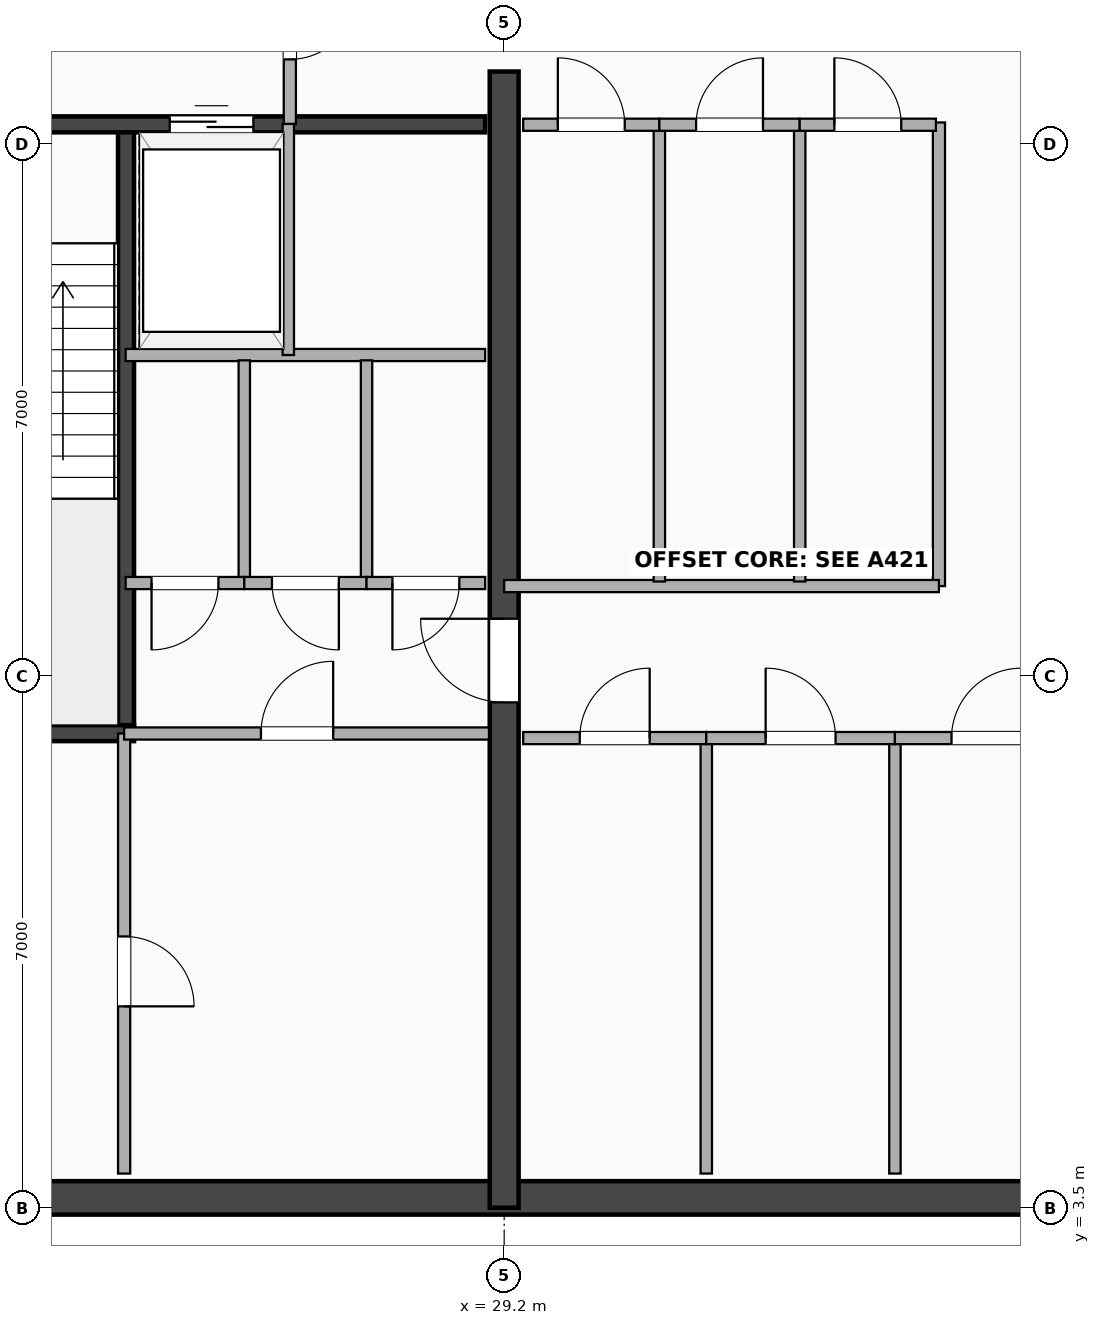
"""IFC4 building model, lengths in metres.
Left out: names, types, materials, properties, quantities, classifications, styles, units other than length and angle.
Written with IfcOpenShell. Run it as: python <this file> out.ifc"""

import sys

from ifc_helpers import new_model, si_unit, direction, frame, frame_2d, origin, place, context, subcontext, project, spatial, rectangle, extrude, element, fill, save


model = new_model("IFC4")
c1 = context("Model", 3, precision=1e-05, world=origin(), true_north=direction((0.0, 1.0)))
c2 = subcontext(c1, "Body", "Model", "MODEL_VIEW")
j1 = project(units=[si_unit("LENGTHUNIT", "METRE"), si_unit("PLANEANGLEUNIT", "RADIAN")], contexts=[c1])
p1 = place(None, origin())
s1 = spatial("IfcSite", under=j1, at=p1, CompositionType="ELEMENT")
p2 = place(p1, origin())
s2 = spatial("IfcBuilding", under=s1, at=p2, CompositionType="ELEMENT")
p3 = place(p2, frame((0.0, 0.0, 303.3)))
s3 = spatial("IfcBuildingStorey", under=s2, at=p3, CompositionType="ELEMENT", Elevation=303.3)
p4 = place(p3, frame((17.8, 3.63, 0.0), z_axis=(0.0, 0.0, 1.0), x_axis=(1.0, 0.0, 0.0)))
e1 = element("IfcWall", 1, at=p4, inside=s3, PredefinedType="SHEAR", context=c2, shape_type="SweptSolid", body=[
    extrude(rectangle(XDim=27.75, YDim=0.44, at=frame_2d((13.875, 0.0))), origin(), (0.0, 0.0, 1.0), 4.3),
])
p5 = place(p3, frame((29.2, 3.5, 0.0), z_axis=(0.0, 0.0, 1.0), x_axis=(0.0, 1.0, 0.0)))
e2 = element("IfcWall", 2, at=p5, inside=s3, PredefinedType="SHEAR", context=c2, shape_type="SweptSolid", body=[
    extrude(rectangle(XDim=14.95, YDim=0.38, at=frame_2d((7.475, 0.0))), origin(), (0.0, 0.0, 1.0), 4.3),
])
p6 = place(p5, frame((7.75, 0.0, 0.0), z_axis=(0.0, 0.0, 1.0), x_axis=(-1.0, 0.0, 0.0)))
e3 = element("IfcOpeningElement", 3, at=p6, cuts=e2, PredefinedType="OPENING", context=c2, shape_type="SweptSolid", body=[
    extrude(rectangle(XDim=1.1, YDim=2.15, at=frame_2d((0.55, 1.075))), frame((0.0, 0.2, 0.0), z_axis=(0.0, -1.0, 0.0), x_axis=(1.0, 0.0, 0.0)), (0.0, 0.0, 1.0), 0.4),
])
p7 = place(p3, frame((24.225, 9.745, 0.0), z_axis=(0.0, 0.0, 1.0), x_axis=(0.0, 1.0, 0.0)))
e4 = element("IfcWall", 4, at=p7, inside=s3, PredefinedType="SHEAR", context=c2, shape_type="SweptSolid", body=[
    extrude(rectangle(XDim=8.01, YDim=0.21, at=frame_2d((4.005, 0.0))), origin(), (0.0, 0.0, 1.0), 4.3),
])
p8 = place(p3, frame((20.67, 9.745, 0.0), z_axis=(0.0, 0.0, 1.0), x_axis=(1.0, 0.0, 0.0)))
e5 = element("IfcWall", 5, at=p8, inside=s3, PredefinedType="SHEAR", context=c2, shape_type="SweptSolid", body=[
    extrude(rectangle(XDim=3.66, YDim=0.21, at=frame_2d((1.83, 0.0))), origin(), (0.0, 0.0, 1.0), 4.3),
])
p9 = place(p3, frame((20.65, 17.755, 0.0), z_axis=(0.0, 0.0, 1.0), x_axis=(1.0, 0.0, 0.0)))
e6 = element("IfcWall", 6, at=p9, inside=s3, PredefinedType="SHEAR", context=c2, shape_type="SweptSolid", body=[
    extrude(rectangle(XDim=8.3, YDim=0.21, at=frame_2d((4.15, 0.0))), origin(), (0.0, 0.0, 1.0), 4.3),
])
p10 = place(p9, frame((2.2, 0.0, 0.0), z_axis=(0.0, 0.0, 1.0), x_axis=(-1.0, 0.0, 0.0)))
e7 = element("IfcOpeningElement", 7, at=p10, cuts=e6, PredefinedType="OPENING", context=c2, shape_type="SweptSolid", body=[
    extrude(rectangle(XDim=1.05, YDim=2.15, at=frame_2d((0.525, 1.075))), frame((0.0, 0.115, 0.0), z_axis=(0.0, -1.0, 0.0), x_axis=(1.0, 0.0, 0.0)), (0.0, 0.0, 1.0), 0.23),
])
p11 = place(p9, frame((4.15, 0.0, 0.0)))
e8 = element("IfcOpeningElement", 8, at=p11, cuts=e6, PredefinedType="OPENING", context=c2, shape_type="SweptSolid", body=[
    extrude(rectangle(XDim=1.1, YDim=2.18, at=frame_2d((0.55, 1.09))), frame((0.0, 0.115, 0.0), z_axis=(0.0, -1.0, 0.0), x_axis=(1.0, 0.0, 0.0)), (0.0, 0.0, 1.0), 0.23),
])
p12 = place(p3, frame((26.38, 17.76, 0.0), z_axis=(0.0, 0.0, 1.0), x_axis=(0.0, 1.0, 0.0)))
e9 = element("IfcWall", 9, at=p12, inside=s3, PredefinedType="PARTITIONING", context=c2, shape_type="SweptSolid", body=[
    extrude(rectangle(XDim=2.66, YDim=0.16, at=frame_2d((1.33, 0.0))), origin(), (0.0, 0.0, 1.0), 3.512),
])
p13 = place(p12, frame((0.85, 0.0, 0.0)))
e10 = element("IfcOpeningElement", 10, at=p13, cuts=e9, PredefinedType="OPENING", context=c2, shape_type="SweptSolid", body=[
    extrude(rectangle(XDim=0.88, YDim=2.08, at=frame_2d((0.44, 1.04))), frame((0.0, 0.09, 0.0), z_axis=(0.0, -1.0, 0.0), x_axis=(1.0, 0.0, 0.0)), (0.0, 0.0, 1.0), 0.18),
])
p14 = place(p3, frame((24.22, 14.72, 0.0), z_axis=(0.0, 0.0, 1.0), x_axis=(1.0, 0.0, 0.0)))
e11 = element("IfcWall", 11, at=p14, inside=s3, PredefinedType="PARTITIONING", context=c2, shape_type="SweptSolid", body=[
    extrude(rectangle(XDim=4.73, YDim=0.16, at=frame_2d((2.365, 0.0))), origin(), (0.0, 0.0, 1.0), 4.3),
])
p15 = place(p3, frame((26.36, 14.72, 0.0), z_axis=(0.0, 0.0, 1.0), x_axis=(0.0, 1.0, 0.0)))
e12 = element("IfcWall", 12, at=p15, inside=s3, PredefinedType="PARTITIONING", context=c2, shape_type="SweptSolid", body=[
    extrude(rectangle(XDim=3.04, YDim=0.15, at=frame_2d((1.52, 0.0))), origin(), (0.0, 0.0, 1.0), 4.3),
])
p16 = place(p3, frame((25.781, 11.72, 0.0), z_axis=(0.0, 0.0, 1.0), x_axis=(0.0, 1.0, 0.0)))
e13 = element("IfcWall", 13, at=p16, inside=s3, PredefinedType="PARTITIONING", context=c2, shape_type="SweptSolid", body=[
    extrude(rectangle(XDim=2.93, YDim=0.15, at=frame_2d((1.465, 0.0))), origin(), (0.0, 0.0, 1.0), 4.3),
])
p17 = place(p3, frame((24.22, 11.72, 0.0), z_axis=(0.0, 0.0, 1.0), x_axis=(1.0, 0.0, 0.0)))
e14 = element("IfcWall", 14, at=p17, inside=s3, PredefinedType="PARTITIONING", context=c2, shape_type="SweptSolid", body=[
    extrude(rectangle(XDim=1.561, YDim=0.16, at=frame_2d((0.781, 0.0))), origin(), (0.0, 0.0, 1.0), 4.3),
])
p18 = place(p17, frame((0.341, 0.0, 0.0)))
e15 = element("IfcOpeningElement", 15, at=p18, cuts=e14, PredefinedType="OPENING", context=c2, shape_type="SweptSolid", body=[
    extrude(rectangle(XDim=0.88, YDim=2.08, at=frame_2d((0.44, 1.04))), frame((0.0, 0.09, 0.0), z_axis=(0.0, -1.0, 0.0), x_axis=(1.0, 0.0, 0.0)), (0.0, 0.0, 1.0), 0.18),
])
p19 = place(p3, frame((27.389, 11.72, 0.0), z_axis=(0.0, 0.0, 1.0), x_axis=(0.0, 1.0, 0.0)))
e16 = element("IfcWall", 16, at=p19, inside=s3, PredefinedType="PARTITIONING", context=c2, shape_type="SweptSolid", body=[
    extrude(rectangle(XDim=2.93, YDim=0.15, at=frame_2d((1.465, 0.0))), origin(), (0.0, 0.0, 1.0), 4.3),
])
p20 = place(p3, frame((25.781, 11.72, 0.0), z_axis=(0.0, 0.0, 1.0), x_axis=(1.0, 0.0, 0.0)))
e17 = element("IfcWall", 17, at=p20, inside=s3, PredefinedType="PARTITIONING", context=c2, shape_type="SweptSolid", body=[
    extrude(rectangle(XDim=1.608, YDim=0.16, at=frame_2d((0.804, 0.0))), origin(), (0.0, 0.0, 1.0), 4.3),
])
p21 = place(p20, frame((0.364, 0.0, 0.0)))
e18 = element("IfcOpeningElement", 18, at=p21, cuts=e17, PredefinedType="OPENING", context=c2, shape_type="SweptSolid", body=[
    extrude(rectangle(XDim=0.88, YDim=2.08, at=frame_2d((0.44, 1.04))), frame((0.0, 0.09, 0.0), z_axis=(0.0, -1.0, 0.0), x_axis=(1.0, 0.0, 0.0)), (0.0, 0.0, 1.0), 0.18),
])
p22 = place(p3, frame((27.389, 11.72, 0.0), z_axis=(0.0, 0.0, 1.0), x_axis=(1.0, 0.0, 0.0)))
e19 = element("IfcWall", 19, at=p22, inside=s3, PredefinedType="PARTITIONING", context=c2, shape_type="SweptSolid", body=[
    extrude(rectangle(XDim=1.561, YDim=0.16, at=frame_2d((0.78, 0.0))), origin(), (0.0, 0.0, 1.0), 4.3),
])
p23 = place(p22, frame((0.341, 0.0, 0.0)))
e20 = element("IfcOpeningElement", 20, at=p23, cuts=e19, PredefinedType="OPENING", context=c2, shape_type="SweptSolid", body=[
    extrude(rectangle(XDim=0.88, YDim=2.08, at=frame_2d((0.44, 1.04))), frame((0.0, 0.09, 0.0), z_axis=(0.0, -1.0, 0.0), x_axis=(1.0, 0.0, 0.0)), (0.0, 0.0, 1.0), 0.18),
])
p24 = place(p3, frame((24.2, 3.95, 0.0), z_axis=(0.0, 0.0, 1.0), x_axis=(0.0, 1.0, 0.0)))
e21 = element("IfcWall", 21, at=p24, inside=s3, PredefinedType="PARTITIONING", context=c2, shape_type="SweptSolid", body=[
    extrude(rectangle(XDim=5.79, YDim=0.16, at=frame_2d((2.895, 0.0))), origin(), (0.0, 0.0, 1.0), 3.885),
])
p25 = place(p24, frame((2.2, 0.0, 0.0)))
e22 = element("IfcOpeningElement", 22, at=p25, cuts=e21, PredefinedType="OPENING", context=c2, shape_type="SweptSolid", body=[
    extrude(rectangle(XDim=0.92, YDim=2.08, at=frame_2d((0.46, 1.04))), frame((0.0, 0.09, 0.0), z_axis=(0.0, -1.0, 0.0), x_axis=(1.0, 0.0, 0.0)), (0.0, 0.0, 1.0), 0.18),
])
p26 = place(p3, frame((24.2, 9.74, 0.0), z_axis=(0.0, 0.0, 1.0), x_axis=(1.0, 0.0, 0.0)))
e23 = element("IfcWall", 23, at=p26, inside=s3, PredefinedType="PARTITIONING", context=c2, shape_type="SweptSolid", body=[
    extrude(rectangle(XDim=4.8, YDim=0.16, at=frame_2d((2.4, 0.0))), origin(), (0.0, 0.0, 1.0), 4.3),
])
p27 = place(p26, frame((2.75, 0.0, 0.0), z_axis=(0.0, 0.0, 1.0), x_axis=(-1.0, 0.0, 0.0)))
e24 = element("IfcOpeningElement", 24, at=p27, cuts=e23, PredefinedType="OPENING", context=c2, shape_type="SweptSolid", body=[
    extrude(rectangle(XDim=0.95, YDim=2.15, at=frame_2d((0.475, 1.075))), frame((0.0, 0.09, 0.0), z_axis=(0.0, -1.0, 0.0), x_axis=(1.0, 0.0, 0.0)), (0.0, 0.0, 1.0), 0.18),
])
p28 = place(p3, frame((34.92, 11.68, 0.0), z_axis=(0.0, 0.0, 1.0), x_axis=(0.0, 1.0, 0.0)))
e25 = element("IfcWall", 25, at=p28, inside=s3, PredefinedType="PARTITIONING", context=c2, shape_type="SweptSolid", body=[
    extrude(rectangle(XDim=6.1, YDim=0.16, at=frame_2d((3.05, 0.0))), origin(), (0.0, 0.0, 1.0), 4.3),
])
p29 = place(p3, frame((31.859, 3.95, 0.0), z_axis=(0.0, 0.0, 1.0), x_axis=(0.0, 1.0, 0.0)))
e26 = element("IfcWall", 26, at=p29, inside=s3, PredefinedType="PARTITIONING", context=c2, shape_type="SweptSolid", body=[
    extrude(rectangle(XDim=5.73, YDim=0.15, at=frame_2d((2.865, 0.0))), origin(), (0.0, 0.0, 1.0), 3.885),
])
p30 = place(p3, frame((29.45, 9.68, 0.0), z_axis=(0.0, 0.0, 1.0), x_axis=(1.0, 0.0, 0.0)))
e27 = element("IfcWall", 27, at=p30, inside=s3, PredefinedType="PARTITIONING", context=c2, shape_type="SweptSolid", body=[
    extrude(rectangle(XDim=2.409, YDim=0.16, at=frame_2d((1.205, 0.0))), origin(), (0.0, 0.0, 1.0), 4.3),
])
p31 = place(p30, frame((1.664, 0.0, 0.0), z_axis=(0.0, 0.0, 1.0), x_axis=(-1.0, 0.0, 0.0)))
e28 = element("IfcOpeningElement", 28, at=p31, cuts=e27, PredefinedType="OPENING", context=c2, shape_type="SweptSolid", body=[
    extrude(rectangle(XDim=0.92, YDim=2.08, at=frame_2d((0.46, 1.04))), frame((0.0, 0.09, 0.0), z_axis=(0.0, -1.0, 0.0), x_axis=(1.0, 0.0, 0.0)), (0.0, 0.0, 1.0), 0.18),
])
p32 = place(p3, frame((34.341, 3.95, 0.0), z_axis=(0.0, 0.0, 1.0), x_axis=(0.0, 1.0, 0.0)))
e29 = element("IfcWall", 29, at=p32, inside=s3, PredefinedType="PARTITIONING", context=c2, shape_type="SweptSolid", body=[
    extrude(rectangle(XDim=5.73, YDim=0.15, at=frame_2d((2.865, 0.0))), origin(), (0.0, 0.0, 1.0), 3.885),
])
p33 = place(p3, frame((31.859, 9.68, 0.0), z_axis=(0.0, 0.0, 1.0), x_axis=(1.0, 0.0, 0.0)))
e30 = element("IfcWall", 30, at=p33, inside=s3, PredefinedType="PARTITIONING", context=c2, shape_type="SweptSolid", body=[
    extrude(rectangle(XDim=2.482, YDim=0.16, at=frame_2d((1.241, 0.0))), origin(), (0.0, 0.0, 1.0), 4.3),
])
p34 = place(p33, frame((1.701, 0.0, 0.0), z_axis=(0.0, 0.0, 1.0), x_axis=(-1.0, 0.0, 0.0)))
e31 = element("IfcOpeningElement", 31, at=p34, cuts=e30, PredefinedType="OPENING", context=c2, shape_type="SweptSolid", body=[
    extrude(rectangle(XDim=0.92, YDim=2.08, at=frame_2d((0.46, 1.04))), frame((0.0, 0.09, 0.0), z_axis=(0.0, -1.0, 0.0), x_axis=(1.0, 0.0, 0.0)), (0.0, 0.0, 1.0), 0.18),
])
p35 = place(p3, frame((34.341, 9.68, 0.0), z_axis=(0.0, 0.0, 1.0), x_axis=(1.0, 0.0, 0.0)))
e32 = element("IfcWall", 32, at=p35, inside=s3, PredefinedType="PARTITIONING", context=c2, shape_type="SweptSolid", body=[
    extrude(rectangle(XDim=2.409, YDim=0.16, at=frame_2d((1.205, 0.0))), origin(), (0.0, 0.0, 1.0), 4.3),
])
p36 = place(p35, frame((1.664, 0.0, 0.0), z_axis=(0.0, 0.0, 1.0), x_axis=(-1.0, 0.0, 0.0)))
e33 = element("IfcOpeningElement", 33, at=p36, cuts=e32, PredefinedType="OPENING", context=c2, shape_type="SweptSolid", body=[
    extrude(rectangle(XDim=0.92, YDim=2.08, at=frame_2d((0.46, 1.04))), frame((0.0, 0.09, 0.0), z_axis=(0.0, -1.0, 0.0), x_axis=(1.0, 0.0, 0.0)), (0.0, 0.0, 1.0), 0.18),
])
p37 = place(p3, frame((29.2, 11.68, 0.0), z_axis=(0.0, 0.0, 1.0), x_axis=(1.0, 0.0, 0.0)))
e34 = element("IfcWall", 34, at=p37, inside=s3, PredefinedType="PARTITIONING", context=c2, shape_type="SweptSolid", body=[
    extrude(rectangle(XDim=5.72, YDim=0.16, at=frame_2d((2.86, 0.0))), origin(), (0.0, 0.0, 1.0), 4.3),
])
p38 = place(p3, frame((31.242, 11.74, 0.0), z_axis=(0.0, 0.0, 1.0), x_axis=(0.0, 1.0, 0.0)))
e35 = element("IfcWall", 35, at=p38, inside=s3, PredefinedType="PARTITIONING", context=c2, shape_type="SweptSolid", body=[
    extrude(rectangle(XDim=6.01, YDim=0.15, at=frame_2d((3.005, 0.0))), origin(), (0.0, 0.0, 1.0), 4.3),
])
p39 = place(p3, frame((29.45, 17.75, 0.0), z_axis=(0.0, 0.0, 1.0), x_axis=(1.0, 0.0, 0.0)))
e36 = element("IfcWall", 36, at=p39, inside=s3, PredefinedType="PARTITIONING", context=c2, shape_type="SweptSolid", body=[
    extrude(rectangle(XDim=1.792, YDim=0.16, at=frame_2d((0.896, 0.0))), origin(), (0.0, 0.0, 1.0), 4.3),
])
p40 = place(p39, frame((1.336, 0.0, 0.0), z_axis=(0.0, 0.0, 1.0), x_axis=(-1.0, 0.0, 0.0)))
e37 = element("IfcOpeningElement", 37, at=p40, cuts=e36, PredefinedType="OPENING", context=c2, shape_type="SweptSolid", body=[
    extrude(rectangle(XDim=0.88, YDim=2.08, at=frame_2d((0.44, 1.04))), frame((0.0, 0.09, 0.0), z_axis=(0.0, -1.0, 0.0), x_axis=(1.0, 0.0, 0.0)), (0.0, 0.0, 1.0), 0.18),
])
p41 = place(p3, frame((33.088, 11.74, 0.0), z_axis=(0.0, 0.0, 1.0), x_axis=(0.0, 1.0, 0.0)))
e38 = element("IfcWall", 38, at=p41, inside=s3, PredefinedType="PARTITIONING", context=c2, shape_type="SweptSolid", body=[
    extrude(rectangle(XDim=6.01, YDim=0.15, at=frame_2d((3.005, 0.0))), origin(), (0.0, 0.0, 1.0), 4.3),
])
p42 = place(p3, frame((31.242, 17.75, 0.0), z_axis=(0.0, 0.0, 1.0), x_axis=(1.0, 0.0, 0.0)))
e39 = element("IfcWall", 39, at=p42, inside=s3, PredefinedType="PARTITIONING", context=c2, shape_type="SweptSolid", body=[
    extrude(rectangle(XDim=1.846, YDim=0.16, at=frame_2d((0.923, 0.0))), origin(), (0.0, 0.0, 1.0), 4.3),
])
p43 = place(p42, frame((1.363, 0.0, 0.0), z_axis=(0.0, 0.0, 1.0), x_axis=(-1.0, 0.0, 0.0)))
e40 = element("IfcOpeningElement", 40, at=p43, cuts=e39, PredefinedType="OPENING", context=c2, shape_type="SweptSolid", body=[
    extrude(rectangle(XDim=0.88, YDim=2.08, at=frame_2d((0.44, 1.04))), frame((0.0, 0.09, 0.0), z_axis=(0.0, -1.0, 0.0), x_axis=(1.0, 0.0, 0.0)), (0.0, 0.0, 1.0), 0.18),
])
p44 = place(p3, frame((33.088, 17.75, 0.0), z_axis=(0.0, 0.0, 1.0), x_axis=(1.0, 0.0, 0.0)))
e41 = element("IfcWall", 41, at=p44, inside=s3, PredefinedType="PARTITIONING", context=c2, shape_type="SweptSolid", body=[
    extrude(rectangle(XDim=1.792, YDim=0.16, at=frame_2d((0.896, 0.0))), origin(), (0.0, 0.0, 1.0), 4.3),
])
p45 = place(p44, frame((1.336, 0.0, 0.0), z_axis=(0.0, 0.0, 1.0), x_axis=(-1.0, 0.0, 0.0)))
e42 = element("IfcOpeningElement", 42, at=p45, cuts=e41, PredefinedType="OPENING", context=c2, shape_type="SweptSolid", body=[
    extrude(rectangle(XDim=0.88, YDim=2.08, at=frame_2d((0.44, 1.04))), frame((0.0, 0.09, 0.0), z_axis=(0.0, -1.0, 0.0), x_axis=(1.0, 0.0, 0.0)), (0.0, 0.0, 1.0), 0.18),
])
p46 = place(p11, origin())
e43 = element("IfcDoor", 43, at=p46, inside=s3, OperationType="DOUBLE_DOOR_SLIDING", PredefinedType="DOOR", context=c2, shape_type="SweptSolid", body=[
    extrude(rectangle(XDim=1.1, YDim=2.18, at=frame_2d((0.55, 1.09))), frame((0.0, 0.025, 0.0), z_axis=(0.0, -1.0, 0.0), x_axis=(1.0, 0.0, 0.0)), (0.0, 0.0, 1.0), 0.05),
])
fill(e8, e43)
p47 = place(p6, origin())
e44 = element("IfcDoor", 44, at=p47, inside=s3, OperationType="SINGLE_SWING_RIGHT", PredefinedType="DOOR", context=c2, shape_type="SweptSolid", body=[
    extrude(rectangle(XDim=1.1, YDim=2.15, at=frame_2d((0.55, 1.075))), frame((0.0, 0.025, 0.0), z_axis=(0.0, -1.0, 0.0), x_axis=(1.0, 0.0, 0.0)), (0.0, 0.0, 1.0), 0.05),
])
fill(e3, e44)
p48 = place(p13, origin())
e45 = element("IfcDoor", 45, at=p48, inside=s3, OperationType="SINGLE_SWING_RIGHT", PredefinedType="DOOR", context=c2, shape_type="SweptSolid", body=[
    extrude(rectangle(XDim=0.88, YDim=2.08, at=frame_2d((0.44, 1.04))), frame((0.0, 0.025, 0.0), z_axis=(0.0, -1.0, 0.0), x_axis=(1.0, 0.0, 0.0)), (0.0, 0.0, 1.0), 0.05),
])
fill(e10, e45)
p49 = place(p18, origin())
e46 = element("IfcDoor", 46, at=p49, inside=s3, OperationType="SINGLE_SWING_LEFT", PredefinedType="DOOR", context=c2, shape_type="SweptSolid", body=[
    extrude(rectangle(XDim=0.88, YDim=2.08, at=frame_2d((0.44, 1.04))), frame((0.0, 0.025, 0.0), z_axis=(0.0, -1.0, 0.0), x_axis=(1.0, 0.0, 0.0)), (0.0, 0.0, 1.0), 0.05),
])
fill(e15, e46)
p50 = place(p21, origin())
e47 = element("IfcDoor", 47, at=p50, inside=s3, OperationType="SINGLE_SWING_RIGHT", PredefinedType="DOOR", context=c2, shape_type="SweptSolid", body=[
    extrude(rectangle(XDim=0.88, YDim=2.08, at=frame_2d((0.44, 1.04))), frame((0.0, 0.025, 0.0), z_axis=(0.0, -1.0, 0.0), x_axis=(1.0, 0.0, 0.0)), (0.0, 0.0, 1.0), 0.05),
])
fill(e18, e47)
p51 = place(p23, origin())
e48 = element("IfcDoor", 48, at=p51, inside=s3, OperationType="SINGLE_SWING_LEFT", PredefinedType="DOOR", context=c2, shape_type="SweptSolid", body=[
    extrude(rectangle(XDim=0.88, YDim=2.08, at=frame_2d((0.44, 1.04))), frame((0.0, 0.025, 0.0), z_axis=(0.0, -1.0, 0.0), x_axis=(1.0, 0.0, 0.0)), (0.0, 0.0, 1.0), 0.05),
])
fill(e20, e48)
p52 = place(p25, origin())
e49 = element("IfcDoor", 49, at=p52, inside=s3, OperationType="SINGLE_SWING_LEFT", PredefinedType="DOOR", context=c2, shape_type="SweptSolid", body=[
    extrude(rectangle(XDim=0.92, YDim=2.08, at=frame_2d((0.46, 1.04))), frame((0.0, 0.025, 0.0), z_axis=(0.0, -1.0, 0.0), x_axis=(1.0, 0.0, 0.0)), (0.0, 0.0, 1.0), 0.05),
])
fill(e22, e49)
p53 = place(p27, origin())
e50 = element("IfcDoor", 50, at=p53, inside=s3, OperationType="SINGLE_SWING_RIGHT", PredefinedType="DOOR", context=c2, shape_type="SweptSolid", body=[
    extrude(rectangle(XDim=0.95, YDim=2.15, at=frame_2d((0.475, 1.075))), frame((0.0, 0.025, 0.0), z_axis=(0.0, -1.0, 0.0), x_axis=(1.0, 0.0, 0.0)), (0.0, 0.0, 1.0), 0.05),
])
fill(e24, e50)
p54 = place(p31, origin())
e51 = element("IfcDoor", 51, at=p54, inside=s3, OperationType="SINGLE_SWING_RIGHT", PredefinedType="DOOR", context=c2, shape_type="SweptSolid", body=[
    extrude(rectangle(XDim=0.92, YDim=2.08, at=frame_2d((0.46, 1.04))), frame((0.0, 0.025, 0.0), z_axis=(0.0, -1.0, 0.0), x_axis=(1.0, 0.0, 0.0)), (0.0, 0.0, 1.0), 0.05),
])
fill(e28, e51)
p55 = place(p34, origin())
e52 = element("IfcDoor", 52, at=p55, inside=s3, OperationType="SINGLE_SWING_LEFT", PredefinedType="DOOR", context=c2, shape_type="SweptSolid", body=[
    extrude(rectangle(XDim=0.92, YDim=2.08, at=frame_2d((0.46, 1.04))), frame((0.0, 0.025, 0.0), z_axis=(0.0, -1.0, 0.0), x_axis=(1.0, 0.0, 0.0)), (0.0, 0.0, 1.0), 0.05),
])
fill(e31, e52)
p56 = place(p36, origin())
e53 = element("IfcDoor", 53, at=p56, inside=s3, OperationType="SINGLE_SWING_RIGHT", PredefinedType="DOOR", context=c2, shape_type="SweptSolid", body=[
    extrude(rectangle(XDim=0.92, YDim=2.08, at=frame_2d((0.46, 1.04))), frame((0.0, 0.025, 0.0), z_axis=(0.0, -1.0, 0.0), x_axis=(1.0, 0.0, 0.0)), (0.0, 0.0, 1.0), 0.05),
])
fill(e33, e53)
p57 = place(p40, origin())
e54 = element("IfcDoor", 54, at=p57, inside=s3, OperationType="SINGLE_SWING_LEFT", PredefinedType="DOOR", context=c2, shape_type="SweptSolid", body=[
    extrude(rectangle(XDim=0.88, YDim=2.08, at=frame_2d((0.44, 1.04))), frame((0.0, 0.025, 0.0), z_axis=(0.0, -1.0, 0.0), x_axis=(1.0, 0.0, 0.0)), (0.0, 0.0, 1.0), 0.05),
])
fill(e37, e54)
p58 = place(p43, origin())
e55 = element("IfcDoor", 55, at=p58, inside=s3, OperationType="SINGLE_SWING_RIGHT", PredefinedType="DOOR", context=c2, shape_type="SweptSolid", body=[
    extrude(rectangle(XDim=0.88, YDim=2.08, at=frame_2d((0.44, 1.04))), frame((0.0, 0.025, 0.0), z_axis=(0.0, -1.0, 0.0), x_axis=(1.0, 0.0, 0.0)), (0.0, 0.0, 1.0), 0.05),
])
fill(e40, e55)
p59 = place(p45, origin())
e56 = element("IfcDoor", 56, at=p59, inside=s3, OperationType="SINGLE_SWING_LEFT", PredefinedType="DOOR", context=c2, shape_type="SweptSolid", body=[
    extrude(rectangle(XDim=0.88, YDim=2.08, at=frame_2d((0.44, 1.04))), frame((0.0, 0.025, 0.0), z_axis=(0.0, -1.0, 0.0), x_axis=(1.0, 0.0, 0.0)), (0.0, 0.0, 1.0), 0.05),
])
fill(e42, e56)
save(model, sys.argv[1])
